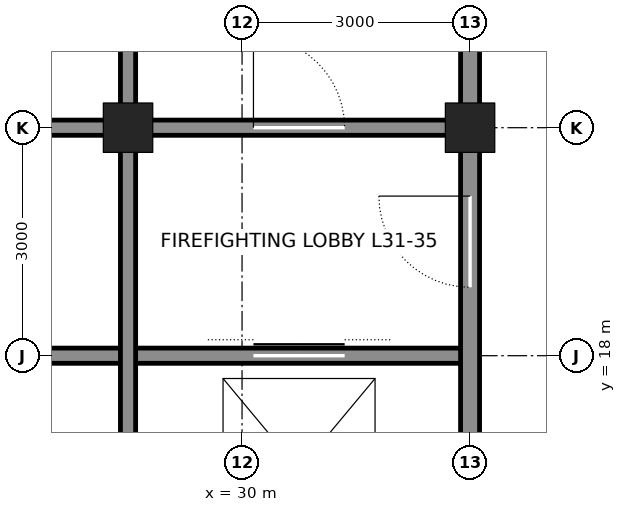
"""IFC4 building model, lengths in metres.
Left out: names, types, materials, properties, quantities, classifications, styles, units other than length and angle.
Written with IfcOpenShell. Run it as: python <this file> out.ifc"""

import sys

from ifc_helpers import new_model, si_unit, direction, frame, frame_2d, origin, origin_2d, place, context, subcontext, project, spatial, rectangle, hollow_rectangle, extrude, element, fill, save


model = new_model("IFC4")
c1 = context("Model", 3, precision=1e-05, world=origin(), true_north=direction((0.0, 1.0)))
c2 = subcontext(c1, "Body", "Model", "MODEL_VIEW")
j1 = project(units=[si_unit("LENGTHUNIT", "METRE"), si_unit("PLANEANGLEUNIT", "RADIAN")], contexts=[c1])
p1 = place(None, origin())
s1 = spatial("IfcSite", under=j1, at=p1, CompositionType="ELEMENT")
p2 = place(p1, origin())
s2 = spatial("IfcBuilding", under=s1, at=p2, CompositionType="ELEMENT")
p3 = place(p2, frame((0.0, 0.0, 144.6)))
s3 = spatial("IfcBuildingStorey", under=s2, at=p3, CompositionType="ELEMENT", Elevation=144.6)
for number, where, z_axis, x_axis in (
    (1, (33.0, 21.0, 0.0), (0.0, 0.0, 1.0), (1.0, 0.0, 0.0)),
    (2, (28.5, 21.0, 0.0), (0.0, 0.0, 1.0), (1.0, 0.0, 0.0)),
):
    element("IfcColumn", number, at=place(p3, frame(where, z_axis=z_axis, x_axis=x_axis)), inside=s3, PredefinedType="COLUMN", context=c2, shape_type="SweptSolid", body=[
        extrude(hollow_rectangle(XDim=0.65, YDim=0.65, WallThickness=0.065, at=origin_2d()), origin(), (0.0, 0.0, 1.0), 4.2),
    ])
p4 = place(p3, frame((25.5, 18.0, 0.0), z_axis=(0.0, 0.0, 1.0), x_axis=(1.0, 0.0, 0.0)))
e3 = element("IfcWall", 3, at=p4, inside=s3, PredefinedType="SOLIDWALL", context=c2, shape_type="SweptSolid", body=[
    extrude(rectangle(XDim=7.5, YDim=0.2, at=frame_2d((3.75, 0.0))), origin(), (0.0, 0.0, 1.0), 4.04),
])
p5 = place(p4, frame((4.65, 0.0, 0.0)))
e4 = element("IfcOpeningElement", 4, at=p5, cuts=e3, PredefinedType="OPENING", context=c2, shape_type="SweptSolid", body=[
    extrude(rectangle(XDim=1.2, YDim=2.1, at=frame_2d((0.6, 1.05))), frame((0.0, 0.11, 0.0), z_axis=(0.0, -1.0, 0.0), x_axis=(1.0, 0.0, 0.0)), (0.0, 0.0, 1.0), 0.22),
])
p6 = place(p3, frame((25.5, 21.0, 0.0), z_axis=(0.0, 0.0, 1.0), x_axis=(1.0, 0.0, 0.0)))
e5 = element("IfcWall", 5, at=p6, inside=s3, PredefinedType="SOLIDWALL", context=c2, shape_type="SweptSolid", body=[
    extrude(rectangle(XDim=2.75, YDim=0.2, at=frame_2d((1.375, 0.0))), origin(), (0.0, 0.0, 1.0), 3.09),
])
p7 = place(p3, frame((28.75, 21.0, 0.0), z_axis=(0.0, 0.0, 1.0), x_axis=(1.0, 0.0, 0.0)))
e6 = element("IfcWall", 6, at=p7, inside=s3, PredefinedType="SOLIDWALL", context=c2, shape_type="SweptSolid", body=[
    extrude(rectangle(XDim=4.0, YDim=0.2, at=frame_2d((2.0, 0.0))), origin(), (0.0, 0.0, 1.0), 3.09),
])
p8 = place(p7, frame((1.4, 0.0, 0.0)))
e7 = element("IfcOpeningElement", 7, at=p8, cuts=e6, PredefinedType="OPENING", context=c2, shape_type="SweptSolid", body=[
    extrude(rectangle(XDim=1.2, YDim=2.1, at=frame_2d((0.6, 1.05))), frame((0.0, 0.11, 0.0), z_axis=(0.0, -1.0, 0.0), x_axis=(1.0, 0.0, 0.0)), (0.0, 0.0, 1.0), 0.22),
])
p9 = place(p3, frame((28.5, 12.25, 0.0), z_axis=(0.0, 0.0, 1.0), x_axis=(0.0, 1.0, 0.0)))
e8 = element("IfcWall", 8, at=p9, inside=s3, PredefinedType="SOLIDWALL", context=c2, shape_type="SweptSolid", body=[
    extrude(rectangle(XDim=8.5, YDim=0.2, at=frame_2d((4.25, 0.0))), origin(), (0.0, 0.0, 1.0), 3.113),
])
p10 = place(p3, frame((28.5, 21.25, 0.0), z_axis=(0.0, 0.0, 1.0), x_axis=(0.0, 1.0, 0.0)))
e9 = element("IfcWall", 9, at=p10, inside=s3, PredefinedType="SOLIDWALL", context=c2, shape_type="SweptSolid", body=[
    extrude(rectangle(XDim=2.5, YDim=0.2, at=frame_2d((1.25, 0.0))), origin(), (0.0, 0.0, 1.0), 3.113),
])
p11 = place(p3, frame((33.0, 12.25, 0.0), z_axis=(0.0, 0.0, 1.0), x_axis=(0.0, 1.0, 0.0)))
e10 = element("IfcWall", 10, at=p11, inside=s3, PredefinedType="SOLIDWALL", context=c2, shape_type="SweptSolid", body=[
    extrude(rectangle(XDim=8.5, YDim=0.25, at=frame_2d((4.25, 0.0))), origin(), (0.0, 0.0, 1.0), 3.113),
])
p12 = place(p11, frame((6.65, 0.0, 0.0)))
e11 = element("IfcOpeningElement", 11, at=p12, cuts=e10, PredefinedType="OPENING", context=c2, shape_type="SweptSolid", body=[
    extrude(rectangle(XDim=1.2, YDim=2.1, at=frame_2d((0.6, 1.05))), frame((0.0, 0.135, 0.0), z_axis=(0.0, -1.0, 0.0), x_axis=(1.0, 0.0, 0.0)), (0.0, 0.0, 1.0), 0.27),
])
p13 = place(p11, frame((0.875, 0.0, 0.0)))
e12 = element("IfcOpeningElement", 12, at=p13, cuts=e10, PredefinedType="OPENING", context=c2, shape_type="SweptSolid", body=[
    extrude(rectangle(XDim=0.75, YDim=2.1, at=frame_2d((0.375, 1.05))), frame((0.0, 0.135, 0.0), z_axis=(0.0, -1.0, 0.0), x_axis=(1.0, 0.0, 0.0)), (0.0, 0.0, 1.0), 0.27),
])
p14 = place(p3, frame((33.0, 21.25, 0.0), z_axis=(0.0, 0.0, 1.0), x_axis=(0.0, 1.0, 0.0)))
e13 = element("IfcWall", 13, at=p14, inside=s3, PredefinedType="SOLIDWALL", context=c2, shape_type="SweptSolid", body=[
    extrude(rectangle(XDim=2.5, YDim=0.25, at=frame_2d((1.25, 0.0))), origin(), (0.0, 0.0, 1.0), 3.113),
])
p15 = place(p8, origin())
e14 = element("IfcDoor", 14, at=p15, inside=s3, OperationType="SINGLE_SWING_LEFT", PredefinedType="DOOR", context=c2, shape_type="SweptSolid", body=[
    extrude(rectangle(XDim=1.2, YDim=2.1, at=frame_2d((0.6, 1.05))), frame((0.0, 0.025, 0.0), z_axis=(0.0, -1.0, 0.0), x_axis=(1.0, 0.0, 0.0)), (0.0, 0.0, 1.0), 0.05),
])
fill(e7, e14)
p16 = place(p12, origin())
e15 = element("IfcDoor", 15, at=p16, inside=s3, OperationType="SINGLE_SWING_RIGHT", PredefinedType="DOOR", context=c2, shape_type="SweptSolid", body=[
    extrude(rectangle(XDim=1.2, YDim=2.1, at=frame_2d((0.6, 1.05))), frame((0.0, 0.025, 0.0), z_axis=(0.0, -1.0, 0.0), x_axis=(1.0, 0.0, 0.0)), (0.0, 0.0, 1.0), 0.05),
])
fill(e11, e15)
p17 = place(p5, origin())
e16 = element("IfcDoor", 16, at=p17, inside=s3, OperationType="DOUBLE_DOOR_SLIDING", PredefinedType="DOOR", context=c2, shape_type="SweptSolid", body=[
    extrude(rectangle(XDim=1.2, YDim=2.1, at=frame_2d((0.6, 1.05))), frame((0.0, 0.025, 0.0), z_axis=(0.0, -1.0, 0.0), x_axis=(1.0, 0.0, 0.0)), (0.0, 0.0, 1.0), 0.05),
])
fill(e4, e16)
save(model, sys.argv[1])
